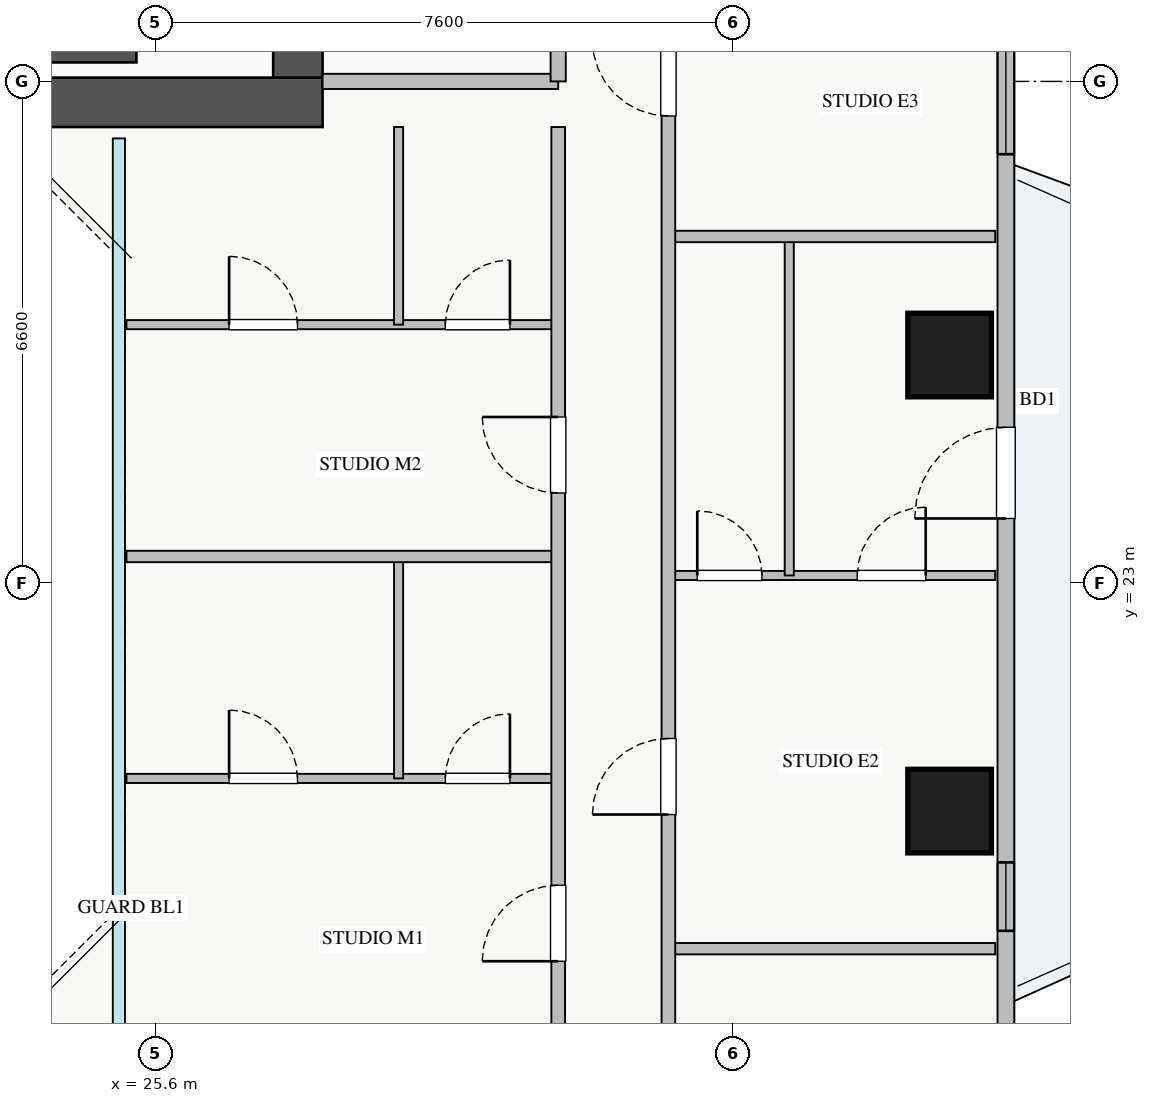
"""IFC4 building model, lengths in metres.
Left out: names, types, materials, properties, quantities, classifications, styles, units other than length and angle.
Written with IfcOpenShell. Run it as: python <this file> out.ifc"""

import sys

from ifc_helpers import new_model, si_unit, direction, frame, frame_2d, origin, origin_2d, place, context, subcontext, project, spatial, rectangle, extrude, source, transform, mapped, element, fill, save


model = new_model("IFC4")
c1 = context("Model", 3, precision=1e-05, world=origin(), true_north=direction((0.0, 1.0)))
c2 = subcontext(c1, "Body", "Model", "MODEL_VIEW")
j1 = project(units=[si_unit("LENGTHUNIT", "METRE"), si_unit("PLANEANGLEUNIT", "RADIAN")], contexts=[c1])
p1 = place(None, origin())
s1 = spatial("IfcSite", under=j1, at=p1, CompositionType="ELEMENT")
p2 = place(p1, origin())
s2 = spatial("IfcBuilding", under=s1, at=p2, CompositionType="ELEMENT")
p3 = place(p2, frame((0.0, 0.0, 129.5)))
s3 = spatial("IfcBuildingStorey", under=s2, at=p3, CompositionType="ELEMENT", Elevation=129.5)
p4 = place(p3, frame((18.2, 29.95, 0.0), z_axis=(0.0, 0.0, 1.0), x_axis=(1.0, 0.0, 0.0)))
e1 = element("IfcWall", 1, at=p4, inside=s3, PredefinedType="SHEAR", context=c2, shape_type="SweptSolid", body=[
    extrude(rectangle(XDim=7.15, YDim=0.2, at=frame_2d((3.575, 0.0))), origin(), (0.0, 0.0, 1.0), 3.25),
])
p5 = place(p3, frame((10.2, 29.325, 0.0), z_axis=(0.0, 0.0, 1.0), x_axis=(1.0, 0.0, 0.0)))
e2 = element("IfcWall", 2, at=p5, inside=s3, PredefinedType="SHEAR", context=c2, shape_type="SweptSolid", body=[
    extrude(rectangle(XDim=17.6, YDim=0.65, at=frame_2d((8.8, 0.0))), origin(), (0.0, 0.0, 1.0), 3.25),
])
p6 = place(p3, frame((27.475, 29.65, 0.0), z_axis=(0.0, 0.0, 1.0), x_axis=(0.0, 1.0, 0.0)))
e3 = element("IfcWall", 3, at=p6, inside=s3, PredefinedType="SHEAR", context=c2, shape_type="SweptSolid", body=[
    extrude(rectangle(XDim=5.9, YDim=0.65, at=frame_2d((2.95, 0.0))), origin(), (0.0, 0.0, 1.0), 3.25),
])
p7 = place(p6, frame((1.1, 0.0, 0.0)))
e4 = element("IfcOpeningElement", 4, at=p7, cuts=e3, PredefinedType="OPENING", context=c2, shape_type="SweptSolid", body=[
    extrude(rectangle(XDim=1.3, YDim=2.05, at=frame_2d((0.65, 1.025))), frame((0.0, 0.335, 0.0), z_axis=(0.0, -1.0, 0.0), x_axis=(1.0, 0.0, 0.0)), (0.0, 0.0, 1.0), 0.67),
])
m1 = source(origin(), c2, "Body", "SweptSolid", [
    extrude(rectangle(XDim=1.1, YDim=1.1, at=origin_2d()), origin(), (0.0, 0.0, 1.0), 3.25),
])
for number, where, z_axis, x_axis in (
    (5, (36.05, 20.0, 0.0), (0.0, 0.0, 1.0), (1.0, 0.0, 0.0)),
    (6, (36.05, 26.0, 0.0), (0.0, 0.0, 1.0), (1.0, 0.0, 0.0)),
):
    element("IfcColumn", number, at=place(p3, frame(where, z_axis=z_axis, x_axis=x_axis)), inside=s3, PredefinedType="COLUMN", context=c2, shape_type="MappedRepresentation", body=[
        mapped(m1, transform((0.0, 0.0, 0.0), x_axis=(1.0, 0.0, 0.0), y_axis=(0.0, 1.0, 0.0), z_axis=(0.0, 0.0, 1.0), scale=1.0)),
    ])
p8 = place(p3, frame((36.79, 10.55, 0.0), z_axis=(0.0, 0.0, 1.0), x_axis=(0.0, 1.0, 0.0)))
e7 = element("IfcWall", 7, at=p8, inside=s3, PredefinedType="STANDARD", context=c2, shape_type="SweptSolid", body=[
    extrude(rectangle(XDim=24.9, YDim=0.22, at=frame_2d((12.45, 0.0))), origin(), (0.0, 0.0, 1.0), 2.61),
])
p9 = place(p8, frame((13.3, 0.0, 0.0)))
e8 = element("IfcOpeningElement", 8, at=p9, cuts=e7, PredefinedType="OPENING", context=c2, shape_type="SweptSolid", body=[
    extrude(rectangle(XDim=1.2, YDim=2.1, at=frame_2d((0.6, 1.05))), frame((0.0, 0.12, 0.0), z_axis=(0.0, -1.0, 0.0), x_axis=(1.0, 0.0, 0.0)), (0.0, 0.0, 1.0), 0.24),
])
p10 = place(p8, frame((1.912, 0.0, 0.9)))
e9 = element("IfcOpeningElement", 9, at=p10, cuts=e7, PredefinedType="OPENING", context=c2, shape_type="SweptSolid", body=[
    extrude(rectangle(XDim=2.4, YDim=1.48, at=frame_2d((1.2, 0.74))), frame((0.0, 0.12, 0.0), z_axis=(0.0, -1.0, 0.0), x_axis=(1.0, 0.0, 0.0)), (0.0, 0.0, 1.0), 0.24),
])
p11 = place(p8, frame((22.165, 0.0, 0.9)))
e10 = element("IfcOpeningElement", 10, at=p11, cuts=e7, PredefinedType="OPENING", context=c2, shape_type="SweptSolid", body=[
    extrude(rectangle(XDim=2.1, YDim=1.5, at=frame_2d((1.05, 0.75))), frame((0.0, 0.12, 0.0), z_axis=(0.0, -1.0, 0.0), x_axis=(1.0, 0.0, 0.0)), (0.0, 0.0, 1.0), 0.24),
])
p12 = place(p8, frame((18.093, 0.0, 0.9)))
e11 = element("IfcOpeningElement", 11, at=p12, cuts=e7, PredefinedType="OPENING", context=c2, shape_type="SweptSolid", body=[
    extrude(rectangle(XDim=2.4, YDim=1.5, at=frame_2d((1.2, 0.75))), frame((0.0, 0.12, 0.0), z_axis=(0.0, -1.0, 0.0), x_axis=(1.0, 0.0, 0.0)), (0.0, 0.0, 1.0), 0.24),
])
p13 = place(p8, frame((7.875, 0.0, 0.9)))
e12 = element("IfcOpeningElement", 12, at=p13, cuts=e7, PredefinedType="OPENING", context=c2, shape_type="SweptSolid", body=[
    extrude(rectangle(XDim=0.9, YDim=1.2, at=frame_2d((0.45, 0.6))), frame((0.0, 0.12, 0.0), z_axis=(0.0, -1.0, 0.0), x_axis=(1.0, 0.0, 0.0)), (0.0, 0.0, 1.0), 0.24),
])
p14 = place(p3, frame((27.8, 29.6, 0.0), z_axis=(0.0, 0.0, 1.0), x_axis=(1.0, 0.0, 0.0)))
e13 = element("IfcWall", 13, at=p14, inside=s3, PredefinedType="PARTITIONING", context=c2, shape_type="SweptSolid", body=[
    extrude(rectangle(XDim=3.1, YDim=0.2, at=frame_2d((1.55, 0.0))), origin(), (0.0, 0.0, 1.0), 3.07),
])
p15 = place(p3, frame((30.9, 29.6, 0.0), z_axis=(0.0, 0.0, 1.0), x_axis=(0.0, 1.0, 0.0)))
e14 = element("IfcWall", 14, at=p15, inside=s3, PredefinedType="PARTITIONING", context=c2, shape_type="SweptSolid", body=[
    extrude(rectangle(XDim=3.9, YDim=0.2, at=frame_2d((1.95, 0.0))), origin(), (0.0, 0.0, 1.0), 3.07),
])
p16 = place(p15, frame((1.4, 0.0, 0.0)))
e15 = element("IfcOpeningElement", 15, at=p16, cuts=e14, PredefinedType="OPENING", context=c2, shape_type="SweptSolid", body=[
    extrude(rectangle(XDim=1.1, YDim=2.05, at=frame_2d((0.55, 1.025))), frame((0.0, 0.11, 0.0), z_axis=(0.0, -1.0, 0.0), x_axis=(1.0, 0.0, 0.0)), (0.0, 0.0, 1.0), 0.22),
])
p17 = place(p3, frame((32.35, 23.1, 0.0), z_axis=(0.0, 0.0, 1.0), x_axis=(1.0, 0.0, 0.0)))
e16 = element("IfcWall", 16, at=p17, inside=s3, PredefinedType="PLUMBINGWALL", context=c2, shape_type="SweptSolid", body=[
    extrude(rectangle(XDim=4.3, YDim=0.12, at=frame_2d((2.15, 0.0))), origin(), (0.0, 0.0, 1.0), 3.07),
])
p18 = place(p17, frame((0.38, 0.0, 0.0)))
e17 = element("IfcOpeningElement", 17, at=p18, cuts=e16, PredefinedType="OPENING", context=c2, shape_type="SweptSolid", body=[
    extrude(rectangle(XDim=0.85, YDim=2.05, at=frame_2d((0.425, 1.025))), frame((0.0, 0.07, 0.0), z_axis=(0.0, -1.0, 0.0), x_axis=(1.0, 0.0, 0.0)), (0.0, 0.0, 1.0), 0.14),
])
p19 = place(p17, frame((2.485, 0.0, 0.0)))
e18 = element("IfcOpeningElement", 18, at=p19, cuts=e16, PredefinedType="OPENING", context=c2, shape_type="SweptSolid", body=[
    extrude(rectangle(XDim=0.9, YDim=2.05, at=frame_2d((0.45, 1.025))), frame((0.0, 0.07, 0.0), z_axis=(0.0, -1.0, 0.0), x_axis=(1.0, 0.0, 0.0)), (0.0, 0.0, 1.0), 0.14),
])
p20 = place(p3, frame((33.94, 23.1, 0.0), z_axis=(0.0, 0.0, 1.0), x_axis=(0.0, 1.0, 0.0)))
e19 = element("IfcWall", 19, at=p20, inside=s3, PredefinedType="PLUMBINGWALL", context=c2, shape_type="SweptSolid", body=[
    extrude(rectangle(XDim=4.46, YDim=0.12, at=frame_2d((2.23, 0.0))), origin(), (0.0, 0.0, 1.0), 3.07),
])
p21 = place(p3, frame((32.35, 18.19, 0.0), z_axis=(0.0, 0.0, 1.0), x_axis=(1.0, 0.0, 0.0)))
e20 = element("IfcWall", 20, at=p21, inside=s3, PredefinedType="PARTITIONING", context=c2, shape_type="SweptSolid", body=[
    extrude(rectangle(XDim=4.3, YDim=0.15, at=frame_2d((2.15, 0.0))), origin(), (0.0, 0.0, 1.0), 2.821),
])
p22 = place(p3, frame((32.35, 27.56, 0.0), z_axis=(0.0, 0.0, 1.0), x_axis=(1.0, 0.0, 0.0)))
e21 = element("IfcWall", 21, at=p22, inside=s3, PredefinedType="PARTITIONING", context=c2, shape_type="SweptSolid", body=[
    extrude(rectangle(XDim=4.3, YDim=0.15, at=frame_2d((2.15, 0.0))), origin(), (0.0, 0.0, 1.0), 3.07),
])
p23 = place(p3, frame((32.35, 8.31, 0.0), z_axis=(0.0, 0.0, 1.0), x_axis=(0.0, 1.0, 0.0)))
e22 = element("IfcWall", 22, at=p23, inside=s3, PredefinedType="PARTITIONING", context=c2, shape_type="SweptSolid", body=[
    extrude(rectangle(XDim=29.37, YDim=0.18, at=frame_2d((14.685, 0.0))), origin(), (0.0, 0.0, 1.0), 3.07),
])
p24 = place(p23, frame((28.06, 0.0, 0.0)))
e23 = element("IfcOpeningElement", 23, at=p24, cuts=e22, PredefinedType="OPENING", context=c2, shape_type="SweptSolid", body=[
    extrude(rectangle(XDim=0.9, YDim=2.05, at=frame_2d((0.45, 1.025))), frame((0.0, 0.1, 0.0), z_axis=(0.0, -1.0, 0.0), x_axis=(1.0, 0.0, 0.0)), (0.0, 0.0, 1.0), 0.2),
])
p25 = place(p23, frame((0.415, 0.0, 0.0)))
e24 = element("IfcOpeningElement", 24, at=p25, cuts=e22, PredefinedType="OPENING", context=c2, shape_type="SweptSolid", body=[
    extrude(rectangle(XDim=0.9, YDim=2.05, at=frame_2d((0.45, 1.025))), frame((0.0, 0.1, 0.0), z_axis=(0.0, -1.0, 0.0), x_axis=(1.0, 0.0, 0.0)), (0.0, 0.0, 1.0), 0.2),
])
p26 = place(p23, frame((5.295, 0.0, 0.0)))
e25 = element("IfcOpeningElement", 25, at=p26, cuts=e22, PredefinedType="OPENING", context=c2, shape_type="SweptSolid", body=[
    extrude(rectangle(XDim=1.0, YDim=2.05, at=frame_2d((0.5, 1.025))), frame((0.0, 0.1, 0.0), z_axis=(0.0, -1.0, 0.0), x_axis=(1.0, 0.0, 0.0)), (0.0, 0.0, 1.0), 0.2),
])
p27 = place(p23, frame((11.645, 0.0, 0.0)))
e26 = element("IfcOpeningElement", 26, at=p27, cuts=e22, PredefinedType="OPENING", context=c2, shape_type="SweptSolid", body=[
    extrude(rectangle(XDim=1.0, YDim=2.05, at=frame_2d((0.5, 1.025))), frame((0.0, 0.1, 0.0), z_axis=(0.0, -1.0, 0.0), x_axis=(1.0, 0.0, 0.0)), (0.0, 0.0, 1.0), 0.2),
])
p28 = place(p23, frame((20.835, 0.0, 0.0)))
e27 = element("IfcOpeningElement", 27, at=p28, cuts=e22, PredefinedType="OPENING", context=c2, shape_type="SweptSolid", body=[
    extrude(rectangle(XDim=1.0, YDim=2.05, at=frame_2d((0.5, 1.025))), frame((0.0, 0.1, 0.0), z_axis=(0.0, -1.0, 0.0), x_axis=(1.0, 0.0, 0.0)), (0.0, 0.0, 1.0), 0.2),
])
p29 = place(p3, frame((25.22, 20.43, 0.0), z_axis=(0.0, 0.0, 1.0), x_axis=(1.0, 0.0, 0.0)))
e28 = element("IfcWall", 28, at=p29, inside=s3, PredefinedType="PLUMBINGWALL", context=c2, shape_type="SweptSolid", body=[
    extrude(rectangle(XDim=5.68, YDim=0.12, at=frame_2d((2.84, 0.0))), origin(), (0.0, 0.0, 1.0), 3.07),
])
p30 = place(p29, frame((1.35, 0.0, 0.0)))
e29 = element("IfcOpeningElement", 29, at=p30, cuts=e28, PredefinedType="OPENING", context=c2, shape_type="SweptSolid", body=[
    extrude(rectangle(XDim=0.9, YDim=2.05, at=frame_2d((0.45, 1.025))), frame((0.0, 0.07, 0.0), z_axis=(0.0, -1.0, 0.0), x_axis=(1.0, 0.0, 0.0)), (0.0, 0.0, 1.0), 0.14),
])
p31 = place(p29, frame((4.195, 0.0, 0.0)))
e30 = element("IfcOpeningElement", 30, at=p31, cuts=e28, PredefinedType="OPENING", context=c2, shape_type="SweptSolid", body=[
    extrude(rectangle(XDim=0.85, YDim=2.05, at=frame_2d((0.425, 1.025))), frame((0.0, 0.07, 0.0), z_axis=(0.0, -1.0, 0.0), x_axis=(1.0, 0.0, 0.0)), (0.0, 0.0, 1.0), 0.14),
])
p32 = place(p3, frame((28.8, 20.43, 0.0), z_axis=(0.0, 0.0, 1.0), x_axis=(0.0, 1.0, 0.0)))
e31 = element("IfcWall", 31, at=p32, inside=s3, PredefinedType="PLUMBINGWALL", context=c2, shape_type="SweptSolid", body=[
    extrude(rectangle(XDim=2.92, YDim=0.12, at=frame_2d((1.46, 0.0))), origin(), (0.0, 0.0, 1.0), 3.07),
])
p33 = place(p3, frame((25.22, 26.4, 0.0), z_axis=(0.0, 0.0, 1.0), x_axis=(1.0, 0.0, 0.0)))
e32 = element("IfcWall", 32, at=p33, inside=s3, PredefinedType="PLUMBINGWALL", context=c2, shape_type="SweptSolid", body=[
    extrude(rectangle(XDim=5.68, YDim=0.12, at=frame_2d((2.84, 0.0))), origin(), (0.0, 0.0, 1.0), 3.07),
])
p34 = place(p33, frame((1.35, 0.0, 0.0)))
e33 = element("IfcOpeningElement", 33, at=p34, cuts=e32, PredefinedType="OPENING", context=c2, shape_type="SweptSolid", body=[
    extrude(rectangle(XDim=0.9, YDim=2.05, at=frame_2d((0.45, 1.025))), frame((0.0, 0.07, 0.0), z_axis=(0.0, -1.0, 0.0), x_axis=(1.0, 0.0, 0.0)), (0.0, 0.0, 1.0), 0.14),
])
p35 = place(p33, frame((4.195, 0.0, 0.0)))
e34 = element("IfcOpeningElement", 34, at=p35, cuts=e32, PredefinedType="OPENING", context=c2, shape_type="SweptSolid", body=[
    extrude(rectangle(XDim=0.85, YDim=2.05, at=frame_2d((0.425, 1.025))), frame((0.0, 0.07, 0.0), z_axis=(0.0, -1.0, 0.0), x_axis=(1.0, 0.0, 0.0)), (0.0, 0.0, 1.0), 0.14),
])
p36 = place(p3, frame((28.8, 26.4, 0.0), z_axis=(0.0, 0.0, 1.0), x_axis=(0.0, 1.0, 0.0)))
e35 = element("IfcWall", 35, at=p36, inside=s3, PredefinedType="PLUMBINGWALL", context=c2, shape_type="SweptSolid", body=[
    extrude(rectangle(XDim=2.6, YDim=0.12, at=frame_2d((1.3, 0.0))), origin(), (0.0, 0.0, 1.0), 3.07),
])
p37 = place(p3, frame((25.22, 23.35, 0.0), z_axis=(0.0, 0.0, 1.0), x_axis=(1.0, 0.0, 0.0)))
e36 = element("IfcWall", 36, at=p37, inside=s3, PredefinedType="PARTITIONING", context=c2, shape_type="SweptSolid", body=[
    extrude(rectangle(XDim=5.68, YDim=0.15, at=frame_2d((2.84, 0.0))), origin(), (0.0, 0.0, 1.0), 3.07),
])
p38 = place(p3, frame((30.9, 17.0, 0.0), z_axis=(0.0, 0.0, 1.0), x_axis=(0.0, 1.0, 0.0)))
e37 = element("IfcWall", 37, at=p38, inside=s3, PredefinedType="PARTITIONING", context=c2, shape_type="SweptSolid", body=[
    extrude(rectangle(XDim=12.0, YDim=0.18, at=frame_2d((6.0, 0.0))), origin(), (0.0, 0.0, 1.0), 3.07),
])
p39 = place(p38, frame((1.025, 0.0, 0.0)))
e38 = element("IfcOpeningElement", 38, at=p39, cuts=e37, PredefinedType="OPENING", context=c2, shape_type="SweptSolid", body=[
    extrude(rectangle(XDim=1.0, YDim=2.05, at=frame_2d((0.5, 1.025))), frame((0.0, 0.1, 0.0), z_axis=(0.0, -1.0, 0.0), x_axis=(1.0, 0.0, 0.0)), (0.0, 0.0, 1.0), 0.2),
])
p40 = place(p38, frame((7.185, 0.0, 0.0)))
e39 = element("IfcOpeningElement", 39, at=p40, cuts=e37, PredefinedType="OPENING", context=c2, shape_type="SweptSolid", body=[
    extrude(rectangle(XDim=1.0, YDim=2.05, at=frame_2d((0.5, 1.025))), frame((0.0, 0.1, 0.0), z_axis=(0.0, -1.0, 0.0), x_axis=(1.0, 0.0, 0.0)), (0.0, 0.0, 1.0), 0.2),
])
m2 = source(origin(), c2, "Body", "SweptSolid", [
    extrude(rectangle(XDim=1.2, YDim=2.1, at=frame_2d((0.6, 1.05))), frame((0.0, 0.025, 0.0), z_axis=(0.0, -1.0, 0.0), x_axis=(1.0, 0.0, 0.0)), (0.0, 0.0, 1.0), 0.05),
])
p41 = place(p9, origin())
e40 = element("IfcDoor", 40, at=p41, inside=s3, OperationType="SINGLE_SWING_LEFT", PredefinedType="DOOR", context=c2, shape_type="MappedRepresentation", body=[
    mapped(m2, transform((0.0, 0.0, 0.0), x_axis=(1.0, 0.0, 0.0), y_axis=(0.0, 1.0, 0.0), z_axis=(0.0, 0.0, 1.0), scale=1.0)),
])
fill(e8, e40)
m3 = source(origin(), c2, "Body", "SweptSolid", [
    extrude(rectangle(XDim=0.85, YDim=2.05, at=frame_2d((0.425, 1.025))), frame((0.0, 0.025, 0.0), z_axis=(0.0, -1.0, 0.0), x_axis=(1.0, 0.0, 0.0)), (0.0, 0.0, 1.0), 0.05),
])
p42 = place(p18, origin())
e41 = element("IfcDoor", 41, at=p42, inside=s3, OperationType="SINGLE_SWING_LEFT", PredefinedType="DOOR", context=c2, shape_type="MappedRepresentation", body=[
    mapped(m3, transform((0.0, 0.0, 0.0), x_axis=(1.0, 0.0, 0.0), y_axis=(0.0, 1.0, 0.0), z_axis=(0.0, 0.0, 1.0), scale=1.0)),
])
fill(e17, e41)
m4 = source(origin(), c2, "Body", "SweptSolid", [
    extrude(rectangle(XDim=0.9, YDim=2.05, at=frame_2d((0.45, 1.025))), frame((0.0, 0.025, 0.0), z_axis=(0.0, -1.0, 0.0), x_axis=(1.0, 0.0, 0.0)), (0.0, 0.0, 1.0), 0.05),
])
p43 = place(p19, origin())
e42 = element("IfcDoor", 42, at=p43, inside=s3, OperationType="SINGLE_SWING_RIGHT", PredefinedType="DOOR", context=c2, shape_type="MappedRepresentation", body=[
    mapped(m4, transform((0.0, 0.0, 0.0), x_axis=(1.0, 0.0, 0.0), y_axis=(0.0, 1.0, 0.0), z_axis=(0.0, 0.0, 1.0), scale=1.0)),
])
fill(e18, e42)
m5 = source(origin(), c2, "Body", "SweptSolid", [
    extrude(rectangle(XDim=1.0, YDim=2.05, at=frame_2d((0.5, 1.025))), frame((0.0, 0.025, 0.0), z_axis=(0.0, -1.0, 0.0), x_axis=(1.0, 0.0, 0.0)), (0.0, 0.0, 1.0), 0.05),
])
p44 = place(p27, origin())
e43 = element("IfcDoor", 43, at=p44, inside=s3, OperationType="SINGLE_SWING_LEFT", PredefinedType="DOOR", context=c2, shape_type="MappedRepresentation", body=[
    mapped(m5, transform((0.0, 0.0, 0.0), x_axis=(1.0, 0.0, 0.0), y_axis=(0.0, 1.0, 0.0), z_axis=(0.0, 0.0, 1.0), scale=1.0)),
])
fill(e26, e43)
p45 = place(p28, origin())
e44 = element("IfcDoor", 44, at=p45, inside=s3, OperationType="SINGLE_SWING_RIGHT", PredefinedType="DOOR", context=c2, shape_type="MappedRepresentation", body=[
    mapped(m5, transform((0.0, 0.0, 0.0), x_axis=(1.0, 0.0, 0.0), y_axis=(0.0, 1.0, 0.0), z_axis=(0.0, 0.0, 1.0), scale=1.0)),
])
fill(e27, e44)
p46 = place(p30, origin())
e45 = element("IfcDoor", 45, at=p46, inside=s3, OperationType="SINGLE_SWING_LEFT", PredefinedType="DOOR", context=c2, shape_type="MappedRepresentation", body=[
    mapped(m4, transform((0.0, 0.0, 0.0), x_axis=(1.0, 0.0, 0.0), y_axis=(0.0, 1.0, 0.0), z_axis=(0.0, 0.0, 1.0), scale=1.0)),
])
fill(e29, e45)
p47 = place(p31, origin())
e46 = element("IfcDoor", 46, at=p47, inside=s3, OperationType="SINGLE_SWING_RIGHT", PredefinedType="DOOR", context=c2, shape_type="MappedRepresentation", body=[
    mapped(m3, transform((0.0, 0.0, 0.0), x_axis=(1.0, 0.0, 0.0), y_axis=(0.0, 1.0, 0.0), z_axis=(0.0, 0.0, 1.0), scale=1.0)),
])
fill(e30, e46)
p48 = place(p34, origin())
e47 = element("IfcDoor", 47, at=p48, inside=s3, OperationType="SINGLE_SWING_LEFT", PredefinedType="DOOR", context=c2, shape_type="MappedRepresentation", body=[
    mapped(m4, transform((0.0, 0.0, 0.0), x_axis=(1.0, 0.0, 0.0), y_axis=(0.0, 1.0, 0.0), z_axis=(0.0, 0.0, 1.0), scale=1.0)),
])
fill(e33, e47)
p49 = place(p35, origin())
e48 = element("IfcDoor", 48, at=p49, inside=s3, OperationType="SINGLE_SWING_RIGHT", PredefinedType="DOOR", context=c2, shape_type="MappedRepresentation", body=[
    mapped(m3, transform((0.0, 0.0, 0.0), x_axis=(1.0, 0.0, 0.0), y_axis=(0.0, 1.0, 0.0), z_axis=(0.0, 0.0, 1.0), scale=1.0)),
])
fill(e34, e48)
p50 = place(p39, origin())
e49 = element("IfcDoor", 49, at=p50, inside=s3, OperationType="SINGLE_SWING_LEFT", PredefinedType="DOOR", context=c2, shape_type="MappedRepresentation", body=[
    mapped(m5, transform((0.0, 0.0, 0.0), x_axis=(1.0, 0.0, 0.0), y_axis=(0.0, 1.0, 0.0), z_axis=(0.0, 0.0, 1.0), scale=1.0)),
])
fill(e38, e49)
p51 = place(p40, origin())
e50 = element("IfcDoor", 50, at=p51, inside=s3, OperationType="SINGLE_SWING_RIGHT", PredefinedType="DOOR", context=c2, shape_type="MappedRepresentation", body=[
    mapped(m5, transform((0.0, 0.0, 0.0), x_axis=(1.0, 0.0, 0.0), y_axis=(0.0, 1.0, 0.0), z_axis=(0.0, 0.0, 1.0), scale=1.0)),
])
fill(e39, e50)
m6 = source(origin(), c2, "Body", "SweptSolid", [
    extrude(rectangle(XDim=2.4, YDim=1.5, at=frame_2d((1.2, 0.75))), frame((0.0, 0.03, 0.0), z_axis=(0.0, -1.0, 0.0), x_axis=(1.0, 0.0, 0.0)), (0.0, 0.0, 1.0), 0.06),
])
p52 = place(p12, origin())
e51 = element("IfcWindow", 51, at=p52, inside=s3, PartitioningType="TRIPLE_PANEL_VERTICAL", PredefinedType="WINDOW", context=c2, shape_type="MappedRepresentation", body=[
    mapped(m6, transform((0.0, 0.0, 0.0), x_axis=(1.0, 0.0, 0.0), y_axis=(0.0, 1.0, 0.0), z_axis=(0.0, 0.0, 1.0), scale=1.0)),
])
fill(e11, e51)
m7 = source(origin(), c2, "Body", "SweptSolid", [
    extrude(rectangle(XDim=0.9, YDim=1.2, at=frame_2d((0.45, 0.6))), frame((0.0, 0.03, 0.0), z_axis=(0.0, -1.0, 0.0), x_axis=(1.0, 0.0, 0.0)), (0.0, 0.0, 1.0), 0.06),
])
p53 = place(p13, origin())
e52 = element("IfcWindow", 52, at=p53, inside=s3, PartitioningType="SINGLE_PANEL", PredefinedType="WINDOW", context=c2, shape_type="MappedRepresentation", body=[
    mapped(m7, transform((0.0, 0.0, 0.0), x_axis=(1.0, 0.0, 0.0), y_axis=(0.0, 1.0, 0.0), z_axis=(0.0, 0.0, 1.0), scale=1.0)),
])
fill(e12, e52)
save(model, sys.argv[1])
